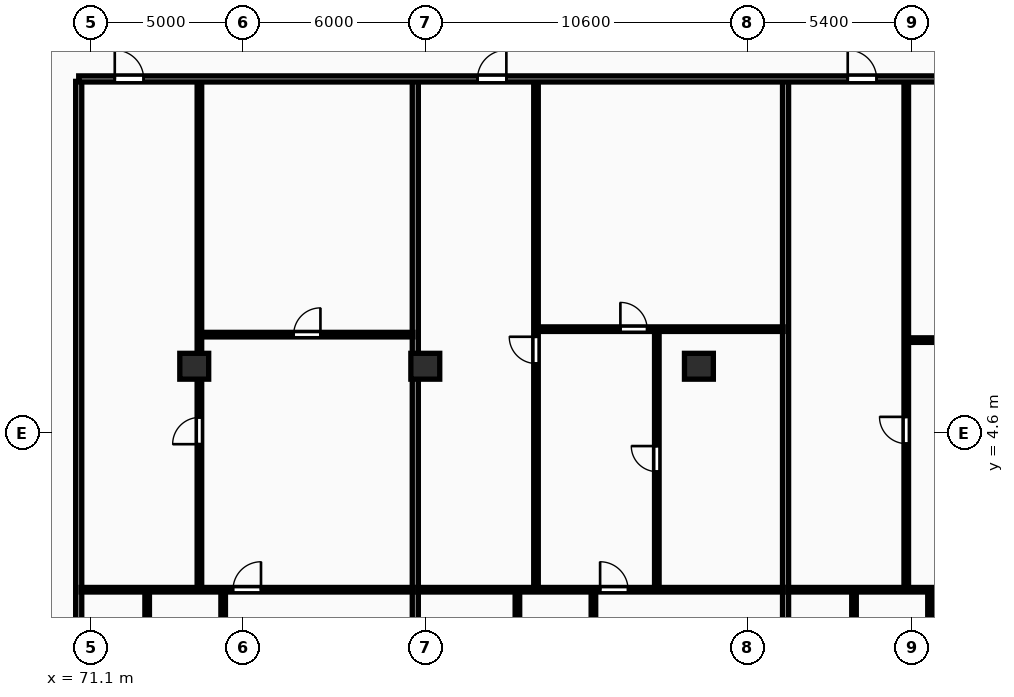
"""IFC4 building model, lengths in metres.
Left out: names, types, materials, properties, quantities, classifications, styles, units other than length and angle.
Written with IfcOpenShell. Run it as: python <this file> out.ifc"""

import sys

from ifc_helpers import new_model, si_unit, direction, frame, frame_2d, origin, origin_2d, place, context, subcontext, project, spatial, rectangle, extrude, element, fill, save


model = new_model("IFC4")
c1 = context("Model", 3, precision=1e-05, world=origin(), true_north=direction((0.0, 1.0)))
c2 = subcontext(c1, "Body", "Model", "MODEL_VIEW")
j1 = project(units=[si_unit("LENGTHUNIT", "METRE"), si_unit("PLANEANGLEUNIT", "RADIAN")], contexts=[c1])
p1 = place(None, origin())
s1 = spatial("IfcSite", under=j1, at=p1, CompositionType="ELEMENT")
p2 = place(p1, origin())
s2 = spatial("IfcBuilding", under=s1, at=p2, CompositionType="ELEMENT")
p3 = place(p2, frame((0.0, 0.0, 24.0)))
s3 = spatial("IfcBuildingStorey", under=s2, at=p3, CompositionType="ELEMENT", Elevation=24.0)
for number, where, z_axis, x_axis in (
    (1, (74.5, 6.8, 0.0), (0.0, 0.0, 1.0), (1.0, 0.0, 0.0)),
    (2, (82.1, 6.8, 0.0), (0.0, 0.0, 1.0), (1.0, 0.0, 0.0)),
    (3, (91.1, 6.8, 0.0), (0.0, 0.0, 1.0), (1.0, 0.0, 0.0)),
):
    element("IfcColumn", number, at=place(p3, frame(where, z_axis=z_axis, x_axis=x_axis)), inside=s3, PredefinedType="COLUMN", context=c2, shape_type="SweptSolid", body=[
        extrude(rectangle(XDim=0.95, YDim=0.85, at=origin_2d()), origin(), (0.0, 0.0, 1.0), 3.25),
    ])
p4 = place(p3, frame((70.7, -10.9, 0.0), z_axis=(0.0, 0.0, 1.0), x_axis=(0.0, 1.0, 0.0)))
e4 = element("IfcWall", 4, at=p4, inside=s3, PredefinedType="PARTITIONING", context=c2, shape_type="SweptSolid", body=[
    extrude(rectangle(XDim=27.07, YDim=0.2, at=frame_2d((13.535, 0.0))), origin(), (0.0, 0.0, 1.0), 2.97),
])
p5 = place(p3, frame((81.771, -10.9, 0.0), z_axis=(0.0, 0.0, 1.0), x_axis=(0.0, 1.0, 0.0)))
e5 = element("IfcWall", 5, at=p5, inside=s3, PredefinedType="PARTITIONING", context=c2, shape_type="SweptSolid", body=[
    extrude(rectangle(XDim=27.07, YDim=0.2, at=frame_2d((13.535, 0.0))), origin(), (0.0, 0.0, 1.0), 2.22),
])
p6 = place(p3, frame((74.73, 7.84, 0.0), z_axis=(0.0, 0.0, 1.0), x_axis=(1.0, 0.0, 0.0)))
e6 = element("IfcWall", 6, at=p6, inside=s3, PredefinedType="PARTITIONING", context=c2, shape_type="SweptSolid", body=[
    extrude(rectangle(XDim=6.961, YDim=0.15, at=frame_2d((3.481, 0.0))), origin(), (0.0, 0.0, 1.0), 2.97),
])
p7 = place(p6, frame((3.041, 0.0, 0.0)))
e7 = element("IfcOpeningElement", 7, at=p7, cuts=e6, PredefinedType="OPENING", context=c2, shape_type="SweptSolid", body=[
    extrude(rectangle(XDim=0.88, YDim=2.06, at=frame_2d((0.44, 1.03))), frame((0.0, 0.085, 0.0), z_axis=(0.0, -1.0, 0.0), x_axis=(1.0, 0.0, 0.0)), (0.0, 0.0, 1.0), 0.17),
])
p8 = place(p3, frame((74.67, -0.51, 0.0), z_axis=(0.0, 0.0, 1.0), x_axis=(0.0, 1.0, 0.0)))
e8 = element("IfcWall", 8, at=p8, inside=s3, PredefinedType="PARTITIONING", context=c2, shape_type="SweptSolid", body=[
    extrude(rectangle(XDim=16.7, YDim=0.15, at=frame_2d((8.35, 0.0))), origin(), (0.0, 0.0, 1.0), 2.22),
])
p9 = place(p8, frame((4.747, 0.0, 0.0)))
e9 = element("IfcOpeningElement", 9, at=p9, cuts=e8, PredefinedType="OPENING", context=c2, shape_type="SweptSolid", body=[
    extrude(rectangle(XDim=0.88, YDim=2.06, at=frame_2d((0.44, 1.03))), frame((0.0, 0.085, 0.0), z_axis=(0.0, -1.0, 0.0), x_axis=(1.0, 0.0, 0.0)), (0.0, 0.0, 1.0), 0.17),
])
p10 = place(p3, frame((72.951, -5.59, 0.0), z_axis=(0.0, 0.0, 1.0), x_axis=(0.0, 1.0, 0.0)))
e10 = element("IfcWall", 10, at=p10, inside=s3, PredefinedType="PARTITIONING", context=c2, shape_type="SweptSolid", body=[
    extrude(rectangle(XDim=5.0, YDim=0.15, at=frame_2d((2.5, 0.0))), origin(), (0.0, 0.0, 1.0), 2.97),
])
p11 = place(p10, frame((3.049, 0.0, 0.0)))
e11 = element("IfcOpeningElement", 11, at=p11, cuts=e10, PredefinedType="OPENING", context=c2, shape_type="SweptSolid", body=[
    extrude(rectangle(XDim=0.84, YDim=2.04, at=frame_2d((0.42, 1.02))), frame((0.0, 0.085, 0.0), z_axis=(0.0, -1.0, 0.0), x_axis=(1.0, 0.0, 0.0)), (0.0, 0.0, 1.0), 0.17),
])
p12 = place(p3, frame((75.451, -5.59, 0.0), z_axis=(0.0, 0.0, 1.0), x_axis=(0.0, 1.0, 0.0)))
e12 = element("IfcWall", 12, at=p12, inside=s3, PredefinedType="PARTITIONING", context=c2, shape_type="SweptSolid", body=[
    extrude(rectangle(XDim=5.0, YDim=0.15, at=frame_2d((2.5, 0.0))), origin(), (0.0, 0.0, 1.0), 2.97),
])
p13 = place(p12, frame((3.088, 0.0, 0.0)))
e13 = element("IfcOpeningElement", 13, at=p13, cuts=e12, PredefinedType="OPENING", context=c2, shape_type="SweptSolid", body=[
    extrude(rectangle(XDim=0.84, YDim=2.04, at=frame_2d((0.42, 1.02))), frame((0.0, 0.085, 0.0), z_axis=(0.0, -1.0, 0.0), x_axis=(1.0, 0.0, 0.0)), (0.0, 0.0, 1.0), 0.17),
])
p14 = place(p3, frame((70.78, -0.55, 0.0), z_axis=(0.0, 0.0, 1.0), x_axis=(1.0, 0.0, 0.0)))
e14 = element("IfcWall", 14, at=p14, inside=s3, PredefinedType="PARTITIONING", context=c2, shape_type="SweptSolid", body=[
    extrude(rectangle(XDim=10.911, YDim=0.15, at=frame_2d((5.456, 0.0))), origin(), (0.0, 0.0, 1.0), 2.97),
])
p15 = place(p14, frame((4.996, 0.0, 0.0)))
e15 = element("IfcOpeningElement", 15, at=p15, cuts=e14, PredefinedType="OPENING", context=c2, shape_type="SweptSolid", body=[
    extrude(rectangle(XDim=0.92, YDim=2.08, at=frame_2d((0.46, 1.04))), frame((0.0, 0.085, 0.0), z_axis=(0.0, -1.0, 0.0), x_axis=(1.0, 0.0, 0.0)), (0.0, 0.0, 1.0), 0.17),
])
p16 = place(p3, frame((93.95, -10.9, 0.0), z_axis=(0.0, 0.0, 1.0), x_axis=(0.0, 1.0, 0.0)))
e16 = element("IfcWall", 16, at=p16, inside=s3, PredefinedType="PARTITIONING", context=c2, shape_type="SweptSolid", body=[
    extrude(rectangle(XDim=27.07, YDim=0.2, at=frame_2d((13.535, 0.0))), origin(), (0.0, 0.0, 1.0), 2.97),
])
p17 = place(p3, frame((89.716, -0.51, 0.0), z_axis=(0.0, 0.0, 1.0), x_axis=(0.0, 1.0, 0.0)))
e17 = element("IfcWall", 17, at=p17, inside=s3, PredefinedType="PARTITIONING", context=c2, shape_type="SweptSolid", body=[
    extrude(rectangle(XDim=8.53, YDim=0.15, at=frame_2d((4.265, 0.0))), origin(), (0.0, 0.0, 1.0), 2.97),
])
p18 = place(p17, frame((3.845, 0.0, 0.0)))
e18 = element("IfcOpeningElement", 18, at=p18, cuts=e17, PredefinedType="OPENING", context=c2, shape_type="SweptSolid", body=[
    extrude(rectangle(XDim=0.84, YDim=2.04, at=frame_2d((0.42, 1.02))), frame((0.0, 0.085, 0.0), z_axis=(0.0, -1.0, 0.0), x_axis=(1.0, 0.0, 0.0)), (0.0, 0.0, 1.0), 0.17),
])
p19 = place(p3, frame((85.802, 8.02, 0.0), z_axis=(0.0, 0.0, 1.0), x_axis=(1.0, 0.0, 0.0)))
e19 = element("IfcWall", 19, at=p19, inside=s3, PredefinedType="PARTITIONING", context=c2, shape_type="SweptSolid", body=[
    extrude(rectangle(XDim=8.069, YDim=0.15, at=frame_2d((4.034, 0.0))), origin(), (0.0, 0.0, 1.0), 2.97),
])
p20 = place(p19, frame((2.716, 0.0, 0.0)))
e20 = element("IfcOpeningElement", 20, at=p20, cuts=e19, PredefinedType="OPENING", context=c2, shape_type="SweptSolid", body=[
    extrude(rectangle(XDim=0.88, YDim=2.06, at=frame_2d((0.44, 1.03))), frame((0.0, 0.085, 0.0), z_axis=(0.0, -1.0, 0.0), x_axis=(1.0, 0.0, 0.0)), (0.0, 0.0, 1.0), 0.17),
])
p21 = place(p3, frame((85.741, -0.51, 0.0), z_axis=(0.0, 0.0, 1.0), x_axis=(0.0, 1.0, 0.0)))
e21 = element("IfcWall", 21, at=p21, inside=s3, PredefinedType="PARTITIONING", context=c2, shape_type="SweptSolid", body=[
    extrude(rectangle(XDim=16.7, YDim=0.15, at=frame_2d((8.35, 0.0))), origin(), (0.0, 0.0, 1.0), 2.97),
])
p22 = place(p21, frame((7.4, 0.0, 0.0)))
e22 = element("IfcOpeningElement", 22, at=p22, cuts=e21, PredefinedType="OPENING", context=c2, shape_type="SweptSolid", body=[
    extrude(rectangle(XDim=0.88, YDim=2.06, at=frame_2d((0.44, 1.03))), frame((0.0, 0.085, 0.0), z_axis=(0.0, -1.0, 0.0), x_axis=(1.0, 0.0, 0.0)), (0.0, 0.0, 1.0), 0.17),
])
p23 = place(p3, frame((85.13, -5.59, 0.0), z_axis=(0.0, 0.0, 1.0), x_axis=(0.0, 1.0, 0.0)))
e23 = element("IfcWall", 23, at=p23, inside=s3, PredefinedType="PARTITIONING", context=c2, shape_type="SweptSolid", body=[
    extrude(rectangle(XDim=5.0, YDim=0.15, at=frame_2d((2.5, 0.0))), origin(), (0.0, 0.0, 1.0), 2.97),
])
p24 = place(p23, frame((2.08, 0.0, 0.0)))
e24 = element("IfcOpeningElement", 24, at=p24, cuts=e23, PredefinedType="OPENING", context=c2, shape_type="SweptSolid", body=[
    extrude(rectangle(XDim=0.84, YDim=2.04, at=frame_2d((0.42, 1.02))), frame((0.0, 0.085, 0.0), z_axis=(0.0, -1.0, 0.0), x_axis=(1.0, 0.0, 0.0)), (0.0, 0.0, 1.0), 0.17),
])
p25 = place(p3, frame((87.63, -5.59, 0.0), z_axis=(0.0, 0.0, 1.0), x_axis=(0.0, 1.0, 0.0)))
e25 = element("IfcWall", 25, at=p25, inside=s3, PredefinedType="PARTITIONING", context=c2, shape_type="SweptSolid", body=[
    extrude(rectangle(XDim=5.0, YDim=0.15, at=frame_2d((2.5, 0.0))), origin(), (0.0, 0.0, 1.0), 2.97),
])
p26 = place(p25, frame((2.08, 0.0, 0.0)))
e26 = element("IfcOpeningElement", 26, at=p26, cuts=e25, PredefinedType="OPENING", context=c2, shape_type="SweptSolid", body=[
    extrude(rectangle(XDim=0.84, YDim=2.04, at=frame_2d((0.42, 1.02))), frame((0.0, 0.085, 0.0), z_axis=(0.0, -1.0, 0.0), x_axis=(1.0, 0.0, 0.0)), (0.0, 0.0, 1.0), 0.17),
])
p27 = place(p3, frame((81.851, -0.55, 0.0), z_axis=(0.0, 0.0, 1.0), x_axis=(1.0, 0.0, 0.0)))
e27 = element("IfcWall", 27, at=p27, inside=s3, PredefinedType="PARTITIONING", context=c2, shape_type="SweptSolid", body=[
    extrude(rectangle(XDim=12.019, YDim=0.15, at=frame_2d((6.009, 0.0))), origin(), (0.0, 0.0, 1.0), 2.97),
])
p28 = place(p27, frame((5.999, 0.0, 0.0)))
e28 = element("IfcOpeningElement", 28, at=p28, cuts=e27, PredefinedType="OPENING", context=c2, shape_type="SweptSolid", body=[
    extrude(rectangle(XDim=0.92, YDim=2.08, at=frame_2d((0.46, 1.04))), frame((0.0, 0.085, 0.0), z_axis=(0.0, -1.0, 0.0), x_axis=(1.0, 0.0, 0.0)), (0.0, 0.0, 1.0), 0.17),
])
p29 = place(p3, frame((97.98, 7.66, 0.0), z_axis=(0.0, 0.0, 1.0), x_axis=(1.0, 0.0, 0.0)))
e29 = element("IfcWall", 29, at=p29, inside=s3, PredefinedType="PARTITIONING", context=c2, shape_type="SweptSolid", body=[
    extrude(rectangle(XDim=6.961, YDim=0.15, at=frame_2d((3.481, 0.0))), origin(), (0.0, 0.0, 1.0), 2.97),
])
p30 = place(p29, frame((3.794, 0.0, 0.0)))
e30 = element("IfcOpeningElement", 30, at=p30, cuts=e29, PredefinedType="OPENING", context=c2, shape_type="SweptSolid", body=[
    extrude(rectangle(XDim=0.88, YDim=2.06, at=frame_2d((0.44, 1.03))), frame((0.0, 0.085, 0.0), z_axis=(0.0, -1.0, 0.0), x_axis=(1.0, 0.0, 0.0)), (0.0, 0.0, 1.0), 0.17),
])
p31 = place(p3, frame((97.92, -0.51, 0.0), z_axis=(0.0, 0.0, 1.0), x_axis=(0.0, 1.0, 0.0)))
e31 = element("IfcWall", 31, at=p31, inside=s3, PredefinedType="PARTITIONING", context=c2, shape_type="SweptSolid", body=[
    extrude(rectangle(XDim=16.7, YDim=0.15, at=frame_2d((8.35, 0.0))), origin(), (0.0, 0.0, 1.0), 2.97),
])
p32 = place(p31, frame((4.765, 0.0, 0.0)))
e32 = element("IfcOpeningElement", 32, at=p32, cuts=e31, PredefinedType="OPENING", context=c2, shape_type="SweptSolid", body=[
    extrude(rectangle(XDim=0.88, YDim=2.06, at=frame_2d((0.44, 1.03))), frame((0.0, 0.085, 0.0), z_axis=(0.0, -1.0, 0.0), x_axis=(1.0, 0.0, 0.0)), (0.0, 0.0, 1.0), 0.17),
])
p33 = place(p3, frame((96.201, -5.59, 0.0), z_axis=(0.0, 0.0, 1.0), x_axis=(0.0, 1.0, 0.0)))
e33 = element("IfcWall", 33, at=p33, inside=s3, PredefinedType="PARTITIONING", context=c2, shape_type="SweptSolid", body=[
    extrude(rectangle(XDim=5.0, YDim=0.15, at=frame_2d((2.5, 0.0))), origin(), (0.0, 0.0, 1.0), 2.97),
])
p34 = place(p33, frame((2.08, 0.0, 0.0)))
e34 = element("IfcOpeningElement", 34, at=p34, cuts=e33, PredefinedType="OPENING", context=c2, shape_type="SweptSolid", body=[
    extrude(rectangle(XDim=0.84, YDim=2.04, at=frame_2d((0.42, 1.02))), frame((0.0, 0.085, 0.0), z_axis=(0.0, -1.0, 0.0), x_axis=(1.0, 0.0, 0.0)), (0.0, 0.0, 1.0), 0.17),
])
p35 = place(p3, frame((98.701, -5.59, 0.0), z_axis=(0.0, 0.0, 1.0), x_axis=(0.0, 1.0, 0.0)))
e35 = element("IfcWall", 35, at=p35, inside=s3, PredefinedType="PARTITIONING", context=c2, shape_type="SweptSolid", body=[
    extrude(rectangle(XDim=5.0, YDim=0.15, at=frame_2d((2.5, 0.0))), origin(), (0.0, 0.0, 1.0), 2.97),
])
p36 = place(p35, frame((3.088, 0.0, 0.0)))
e36 = element("IfcOpeningElement", 36, at=p36, cuts=e35, PredefinedType="OPENING", context=c2, shape_type="SweptSolid", body=[
    extrude(rectangle(XDim=0.84, YDim=2.04, at=frame_2d((0.42, 1.02))), frame((0.0, 0.085, 0.0), z_axis=(0.0, -1.0, 0.0), x_axis=(1.0, 0.0, 0.0)), (0.0, 0.0, 1.0), 0.17),
])
p37 = place(p3, frame((94.03, -0.55, 0.0), z_axis=(0.0, 0.0, 1.0), x_axis=(1.0, 0.0, 0.0)))
e37 = element("IfcWall", 37, at=p37, inside=s3, PredefinedType="PARTITIONING", context=c2, shape_type="SweptSolid", body=[
    extrude(rectangle(XDim=10.911, YDim=0.15, at=frame_2d((5.456, 0.0))), origin(), (0.0, 0.0, 1.0), 2.97),
])
p38 = place(p37, frame((4.996, 0.0, 0.0)))
e38 = element("IfcOpeningElement", 38, at=p38, cuts=e37, PredefinedType="OPENING", context=c2, shape_type="SweptSolid", body=[
    extrude(rectangle(XDim=0.92, YDim=2.08, at=frame_2d((0.46, 1.04))), frame((0.0, 0.085, 0.0), z_axis=(0.0, -1.0, 0.0), x_axis=(1.0, 0.0, 0.0)), (0.0, 0.0, 1.0), 0.17),
])
p39 = place(p3, frame((70.7, 16.25, 0.0), z_axis=(0.0, 0.0, 1.0), x_axis=(1.0, 0.0, 0.0)))
e39 = element("IfcWall", 39, at=p39, inside=s3, PredefinedType="PARTITIONING", context=c2, shape_type="SweptSolid", body=[
    extrude(rectangle(XDim=62.0, YDim=0.2, at=frame_2d((31.0, 0.0))), origin(), (0.0, 0.0, 1.0), 2.97),
])
p40 = place(p39, frame((1.186, 0.0, 0.0)))
e40 = element("IfcOpeningElement", 40, at=p40, cuts=e39, PredefinedType="OPENING", context=c2, shape_type="SweptSolid", body=[
    extrude(rectangle(XDim=0.95, YDim=2.15, at=frame_2d((0.475, 1.075))), frame((0.0, 0.11, 0.0), z_axis=(0.0, -1.0, 0.0), x_axis=(1.0, 0.0, 0.0)), (0.0, 0.0, 1.0), 0.22),
])
p41 = place(p39, frame((13.116, 0.0, 0.0)))
e41 = element("IfcOpeningElement", 41, at=p41, cuts=e39, PredefinedType="OPENING", context=c2, shape_type="SweptSolid", body=[
    extrude(rectangle(XDim=0.95, YDim=2.15, at=frame_2d((0.475, 1.075))), frame((0.0, 0.11, 0.0), z_axis=(0.0, -1.0, 0.0), x_axis=(1.0, 0.0, 0.0)), (0.0, 0.0, 1.0), 0.22),
])
p42 = place(p39, frame((25.295, 0.0, 0.0)))
e42 = element("IfcOpeningElement", 42, at=p42, cuts=e39, PredefinedType="OPENING", context=c2, shape_type="SweptSolid", body=[
    extrude(rectangle(XDim=0.95, YDim=2.15, at=frame_2d((0.475, 1.075))), frame((0.0, 0.11, 0.0), z_axis=(0.0, -1.0, 0.0), x_axis=(1.0, 0.0, 0.0)), (0.0, 0.0, 1.0), 0.22),
])
p43 = place(p39, frame((35.747, 0.0, 0.0)))
e43 = element("IfcOpeningElement", 43, at=p43, cuts=e39, PredefinedType="OPENING", context=c2, shape_type="SweptSolid", body=[
    extrude(rectangle(XDim=0.95, YDim=2.15, at=frame_2d((0.475, 1.075))), frame((0.0, 0.11, 0.0), z_axis=(0.0, -1.0, 0.0), x_axis=(1.0, 0.0, 0.0)), (0.0, 0.0, 1.0), 0.22),
])
p44 = place(p39, frame((49.652, 0.0, 0.0)))
e44 = element("IfcOpeningElement", 44, at=p44, cuts=e39, PredefinedType="OPENING", context=c2, shape_type="SweptSolid", body=[
    extrude(rectangle(XDim=0.95, YDim=2.15, at=frame_2d((0.475, 1.075))), frame((0.0, 0.11, 0.0), z_axis=(0.0, -1.0, 0.0), x_axis=(1.0, 0.0, 0.0)), (0.0, 0.0, 1.0), 0.22),
])
p45 = place(p7, origin())
e45 = element("IfcDoor", 45, at=p45, inside=s3, OperationType="SINGLE_SWING_RIGHT", PredefinedType="DOOR", context=c2, shape_type="SweptSolid", body=[
    extrude(rectangle(XDim=0.88, YDim=2.06, at=frame_2d((0.44, 1.03))), frame((0.0, 0.025, 0.0), z_axis=(0.0, -1.0, 0.0), x_axis=(1.0, 0.0, 0.0)), (0.0, 0.0, 1.0), 0.05),
])
fill(e7, e45)
p46 = place(p9, origin())
e46 = element("IfcDoor", 46, at=p46, inside=s3, OperationType="SINGLE_SWING_LEFT", PredefinedType="DOOR", context=c2, shape_type="SweptSolid", body=[
    extrude(rectangle(XDim=0.88, YDim=2.06, at=frame_2d((0.44, 1.03))), frame((0.0, 0.025, 0.0), z_axis=(0.0, -1.0, 0.0), x_axis=(1.0, 0.0, 0.0)), (0.0, 0.0, 1.0), 0.05),
])
fill(e9, e46)
p47 = place(p15, origin())
e47 = element("IfcDoor", 47, at=p47, inside=s3, OperationType="SINGLE_SWING_RIGHT", PredefinedType="DOOR", context=c2, shape_type="SweptSolid", body=[
    extrude(rectangle(XDim=0.92, YDim=2.08, at=frame_2d((0.46, 1.04))), frame((0.0, 0.025, 0.0), z_axis=(0.0, -1.0, 0.0), x_axis=(1.0, 0.0, 0.0)), (0.0, 0.0, 1.0), 0.05),
])
fill(e15, e47)
p48 = place(p18, origin())
e48 = element("IfcDoor", 48, at=p48, inside=s3, OperationType="SINGLE_SWING_RIGHT", PredefinedType="DOOR", context=c2, shape_type="SweptSolid", body=[
    extrude(rectangle(XDim=0.84, YDim=2.04, at=frame_2d((0.42, 1.02))), frame((0.0, 0.025, 0.0), z_axis=(0.0, -1.0, 0.0), x_axis=(1.0, 0.0, 0.0)), (0.0, 0.0, 1.0), 0.05),
])
fill(e18, e48)
p49 = place(p20, origin())
e49 = element("IfcDoor", 49, at=p49, inside=s3, OperationType="SINGLE_SWING_LEFT", PredefinedType="DOOR", context=c2, shape_type="SweptSolid", body=[
    extrude(rectangle(XDim=0.88, YDim=2.06, at=frame_2d((0.44, 1.03))), frame((0.0, 0.025, 0.0), z_axis=(0.0, -1.0, 0.0), x_axis=(1.0, 0.0, 0.0)), (0.0, 0.0, 1.0), 0.05),
])
fill(e20, e49)
p50 = place(p22, origin())
e50 = element("IfcDoor", 50, at=p50, inside=s3, OperationType="SINGLE_SWING_RIGHT", PredefinedType="DOOR", context=c2, shape_type="SweptSolid", body=[
    extrude(rectangle(XDim=0.88, YDim=2.06, at=frame_2d((0.44, 1.03))), frame((0.0, 0.025, 0.0), z_axis=(0.0, -1.0, 0.0), x_axis=(1.0, 0.0, 0.0)), (0.0, 0.0, 1.0), 0.05),
])
fill(e22, e50)
p51 = place(p28, origin())
e51 = element("IfcDoor", 51, at=p51, inside=s3, OperationType="SINGLE_SWING_LEFT", PredefinedType="DOOR", context=c2, shape_type="SweptSolid", body=[
    extrude(rectangle(XDim=0.92, YDim=2.08, at=frame_2d((0.46, 1.04))), frame((0.0, 0.025, 0.0), z_axis=(0.0, -1.0, 0.0), x_axis=(1.0, 0.0, 0.0)), (0.0, 0.0, 1.0), 0.05),
])
fill(e28, e51)
p52 = place(p32, origin())
e52 = element("IfcDoor", 52, at=p52, inside=s3, OperationType="SINGLE_SWING_RIGHT", PredefinedType="DOOR", context=c2, shape_type="SweptSolid", body=[
    extrude(rectangle(XDim=0.88, YDim=2.06, at=frame_2d((0.44, 1.03))), frame((0.0, 0.025, 0.0), z_axis=(0.0, -1.0, 0.0), x_axis=(1.0, 0.0, 0.0)), (0.0, 0.0, 1.0), 0.05),
])
fill(e32, e52)
p53 = place(p40, origin())
e53 = element("IfcDoor", 53, at=p53, inside=s3, OperationType="SINGLE_SWING_LEFT", PredefinedType="DOOR", context=c2, shape_type="SweptSolid", body=[
    extrude(rectangle(XDim=0.95, YDim=2.15, at=frame_2d((0.475, 1.075))), frame((0.0, 0.025, 0.0), z_axis=(0.0, -1.0, 0.0), x_axis=(1.0, 0.0, 0.0)), (0.0, 0.0, 1.0), 0.05),
])
fill(e40, e53)
p54 = place(p41, origin())
e54 = element("IfcDoor", 54, at=p54, inside=s3, OperationType="SINGLE_SWING_RIGHT", PredefinedType="DOOR", context=c2, shape_type="SweptSolid", body=[
    extrude(rectangle(XDim=0.95, YDim=2.15, at=frame_2d((0.475, 1.075))), frame((0.0, 0.025, 0.0), z_axis=(0.0, -1.0, 0.0), x_axis=(1.0, 0.0, 0.0)), (0.0, 0.0, 1.0), 0.05),
])
fill(e41, e54)
p55 = place(p42, origin())
e55 = element("IfcDoor", 55, at=p55, inside=s3, OperationType="SINGLE_SWING_LEFT", PredefinedType="DOOR", context=c2, shape_type="SweptSolid", body=[
    extrude(rectangle(XDim=0.95, YDim=2.15, at=frame_2d((0.475, 1.075))), frame((0.0, 0.025, 0.0), z_axis=(0.0, -1.0, 0.0), x_axis=(1.0, 0.0, 0.0)), (0.0, 0.0, 1.0), 0.05),
])
fill(e42, e55)
save(model, sys.argv[1])
